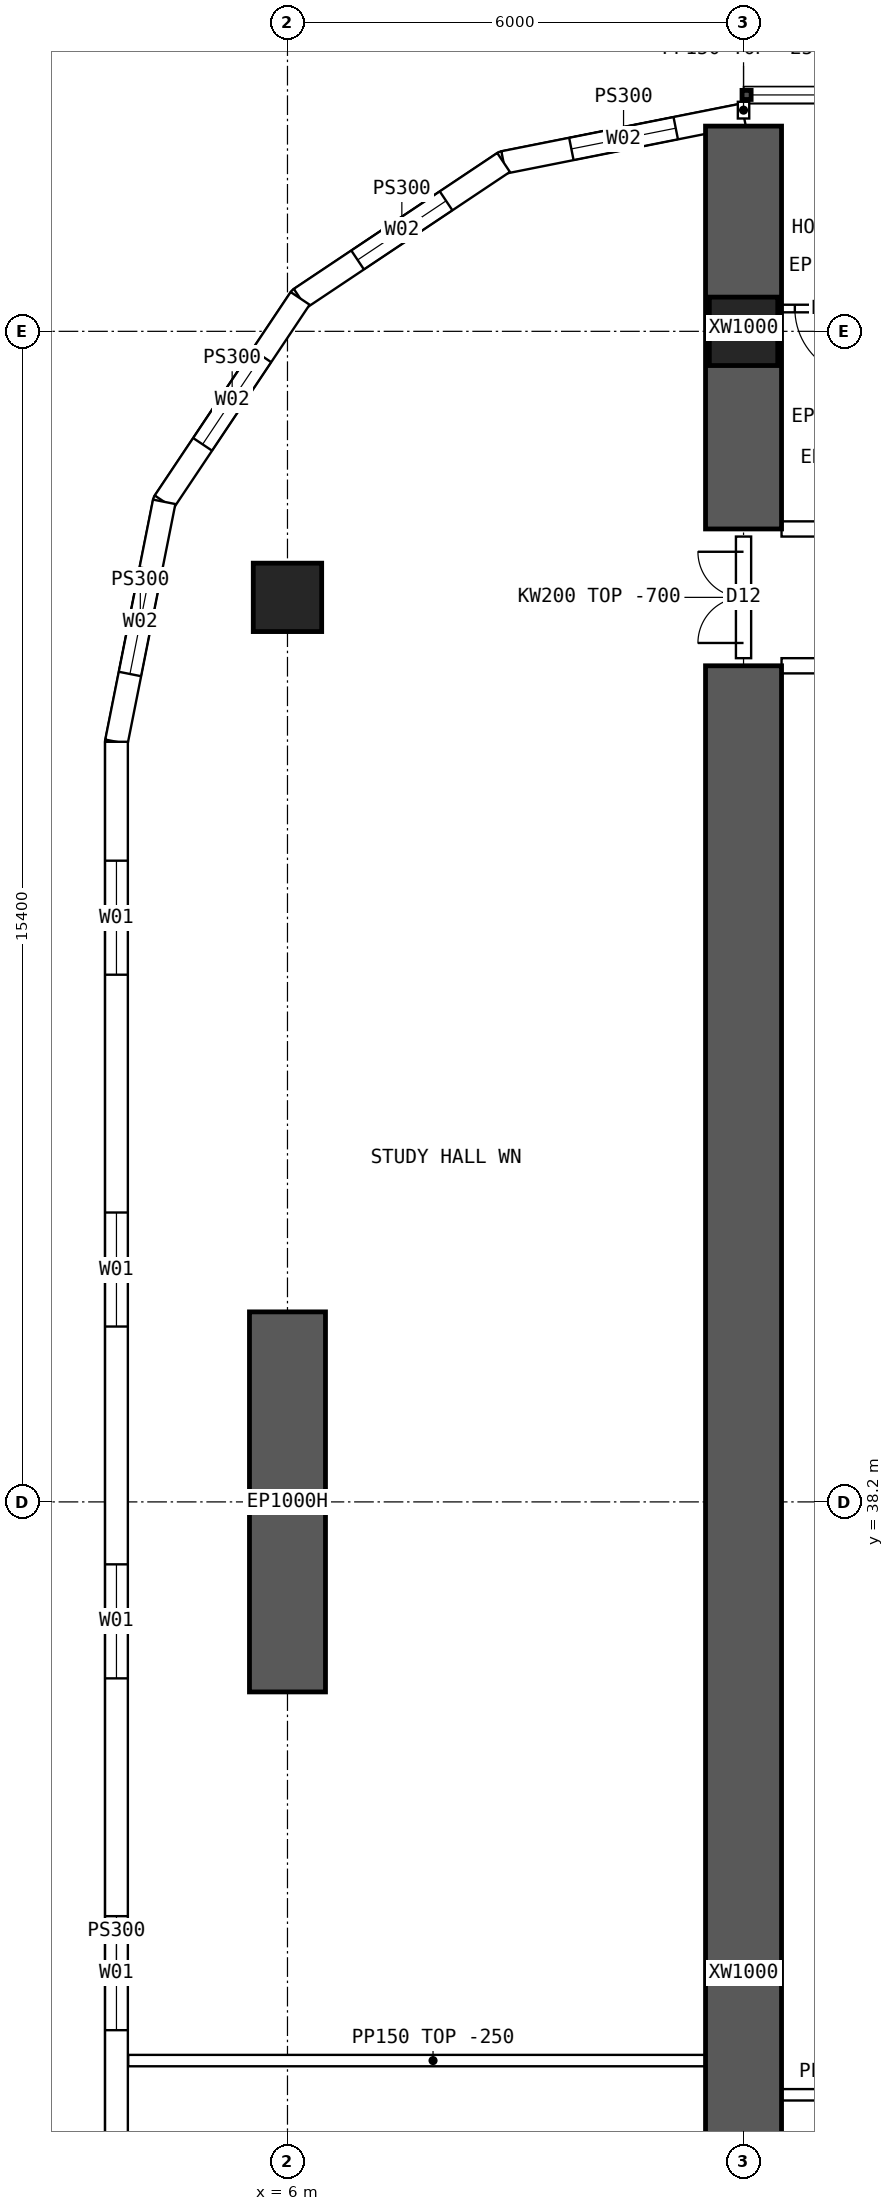
"""IFC4 building model, lengths in metres.
Left out: names, types, materials, properties, quantities, classifications, styles, units other than length and angle.
Written with IfcOpenShell. Run it as: python <this file> out.ifc"""

import sys

from ifc_helpers import new_model, si_unit, direction, frame, frame_2d, origin, origin_2d, place, context, subcontext, project, spatial, polyline, rectangle, hollow_rectangle, outline, extrude, element, fill, save


model = new_model("IFC4")
c1 = context("Model", 3, precision=1e-05, world=origin(), true_north=direction((0.0, 1.0)))
c2 = subcontext(c1, "Body", "Model", "MODEL_VIEW")
j1 = project(units=[si_unit("LENGTHUNIT", "METRE"), si_unit("PLANEANGLEUNIT", "RADIAN")], contexts=[c1])
p1 = place(None, origin())
s1 = spatial("IfcSite", under=j1, at=p1, CompositionType="ELEMENT")
p2 = place(p1, origin())
s2 = spatial("IfcBuilding", under=s1, at=p2, CompositionType="ELEMENT")
p3 = place(p2, frame((0.0, 0.0, 46.45)))
s3 = spatial("IfcBuildingStorey", under=s2, at=p3, CompositionType="ELEMENT", Elevation=46.45)
for number, where, z_axis, x_axis in (
    (1, (12.0, 53.6, 0.0), (0.0, 0.0, 1.0), (1.0, 0.0, 0.0)),
    (2, (6.0, 50.1, 0.0), (0.0, 0.0, 1.0), (1.0, 0.0, 0.0)),
):
    element("IfcColumn", number, at=place(p3, frame(where, z_axis=z_axis, x_axis=x_axis)), inside=s3, PredefinedType="COLUMN", context=c2, shape_type="SweptSolid", body=[
        extrude(hollow_rectangle(XDim=0.9, YDim=0.9, WallThickness=0.09, at=origin_2d()), origin(), (0.0, 0.0, 1.0), 3.75),
    ])
p4 = place(p3, frame((6.0, 35.7, 0.0), z_axis=(0.0, 0.0, 1.0), x_axis=(0.0, 1.0, 0.0)))
e3 = element("IfcWall", 3, at=p4, inside=s3, PredefinedType="SHEAR", context=c2, shape_type="SweptSolid", body=[
    extrude(rectangle(XDim=5.0, YDim=1.0, at=frame_2d((2.5, 0.0))), origin(), (0.0, 0.0, 1.0), 3.75),
])
p5 = place(p3, frame((12.0, 51.0, 0.0), z_axis=(0.0, 0.0, 1.0), x_axis=(0.0, 1.0, 0.0)))
e4 = element("IfcWall", 4, at=p5, inside=s3, PredefinedType="SHEAR", context=c2, shape_type="SweptSolid", body=[
    extrude(rectangle(XDim=5.3, YDim=1.0, at=frame_2d((2.65, 0.0))), origin(), (0.0, 0.0, 1.0), 3.75),
])
p6 = place(p3, frame((12.0, 14.8, 0.0), z_axis=(0.0, 0.0, 1.0), x_axis=(0.0, 1.0, 0.0)))
e5 = element("IfcWall", 5, at=p6, inside=s3, PredefinedType="SHEAR", context=c2, shape_type="SweptSolid", body=[
    extrude(rectangle(XDim=34.4, YDim=1.0, at=frame_2d((17.2, 0.0))), origin(), (0.0, 0.0, 1.0), 3.75),
])
p7 = place(p3, frame((3.75, 48.2, 0.0), z_axis=(0.0, 0.0, 1.0), x_axis=(0.0, -1.0, 0.0)))
e6 = element("IfcWall", 6, at=p7, inside=s3, PredefinedType="SOLIDWALL", context=c2, shape_type="SweptSolid", body=[
    extrude(outline(polyline([(-0.015, -0.15), (32.415, -0.15), (32.385, 0.15), (0.015, 0.15), (-0.015, -0.15)])), origin(), (0.0, 0.0, 1.0), 3.5),
])
p8 = place(p7, frame((1.564, 0.0, 0.9)))
e7 = element("IfcOpeningElement", 7, at=p8, cuts=e6, PredefinedType="OPENING", context=c2, shape_type="SweptSolid", body=[
    extrude(rectangle(XDim=1.5, YDim=2.0, at=frame_2d((0.75, 1.0))), frame((0.0, 0.16, 0.0), z_axis=(0.0, -1.0, 0.0), x_axis=(1.0, 0.0, 0.0)), (0.0, 0.0, 1.0), 0.32),
])
p9 = place(p7, frame((6.193, 0.0, 0.9)))
e8 = element("IfcOpeningElement", 8, at=p9, cuts=e6, PredefinedType="OPENING", context=c2, shape_type="SweptSolid", body=[
    extrude(rectangle(XDim=1.5, YDim=2.0, at=frame_2d((0.75, 1.0))), frame((0.0, 0.16, 0.0), z_axis=(0.0, -1.0, 0.0), x_axis=(1.0, 0.0, 0.0)), (0.0, 0.0, 1.0), 0.32),
])
p10 = place(p7, frame((10.822, 0.0, 0.9)))
e9 = element("IfcOpeningElement", 9, at=p10, cuts=e6, PredefinedType="OPENING", context=c2, shape_type="SweptSolid", body=[
    extrude(rectangle(XDim=1.5, YDim=2.0, at=frame_2d((0.75, 1.0))), frame((0.0, 0.16, 0.0), z_axis=(0.0, -1.0, 0.0), x_axis=(1.0, 0.0, 0.0)), (0.0, 0.0, 1.0), 0.32),
])
p11 = place(p7, frame((15.45, 0.0, 0.9)))
e10 = element("IfcOpeningElement", 10, at=p11, cuts=e6, PredefinedType="OPENING", context=c2, shape_type="SweptSolid", body=[
    extrude(rectangle(XDim=1.5, YDim=2.0, at=frame_2d((0.75, 1.0))), frame((0.0, 0.16, 0.0), z_axis=(0.0, -1.0, 0.0), x_axis=(1.0, 0.0, 0.0)), (0.0, 0.0, 1.0), 0.32),
])
p12 = place(p7, frame((20.079, 0.0, 0.9)))
e11 = element("IfcOpeningElement", 11, at=p12, cuts=e6, PredefinedType="OPENING", context=c2, shape_type="SweptSolid", body=[
    extrude(rectangle(XDim=1.5, YDim=2.0, at=frame_2d((0.75, 1.0))), frame((0.0, 0.16, 0.0), z_axis=(0.0, -1.0, 0.0), x_axis=(1.0, 0.0, 0.0)), (0.0, 0.0, 1.0), 0.32),
])
p13 = place(p7, frame((24.707, 0.0, 0.9)))
e12 = element("IfcOpeningElement", 12, at=p13, cuts=e6, PredefinedType="OPENING", context=c2, shape_type="SweptSolid", body=[
    extrude(rectangle(XDim=1.5, YDim=2.0, at=frame_2d((0.75, 1.0))), frame((0.0, 0.16, 0.0), z_axis=(0.0, -1.0, 0.0), x_axis=(1.0, 0.0, 0.0)), (0.0, 0.0, 1.0), 0.32),
])
p14 = place(p7, frame((29.336, 0.0, 0.9)))
e13 = element("IfcOpeningElement", 13, at=p14, cuts=e6, PredefinedType="OPENING", context=c2, shape_type="SweptSolid", body=[
    extrude(rectangle(XDim=1.5, YDim=2.0, at=frame_2d((0.75, 1.0))), frame((0.0, 0.16, 0.0), z_axis=(0.0, -1.0, 0.0), x_axis=(1.0, 0.0, 0.0)), (0.0, 0.0, 1.0), 0.32),
])
p15 = place(p3, frame((12.0, 56.45, 0.0), z_axis=(0.0, 0.0, 1.0), x_axis=(-0.980787251524, -0.195080412259, 0.0)))
e14 = element("IfcWall", 14, at=p15, inside=s3, PredefinedType="SOLIDWALL", context=c2, shape_type="SweptSolid", body=[
    extrude(outline(polyline([(-0.03, -0.15), (3.249, -0.15), (3.189, 0.15), (0.03, 0.15), (-0.03, -0.15)])), origin(), (0.0, 0.0, 1.0), 3.5),
])
p16 = place(p15, frame((0.909, 0.0, 0.9)))
e15 = element("IfcOpeningElement", 15, at=p16, cuts=e14, PredefinedType="OPENING", context=c2, shape_type="SweptSolid", body=[
    extrude(rectangle(XDim=1.4, YDim=1.8, at=frame_2d((0.7, 0.9))), frame((0.0, 0.16, 0.0), z_axis=(0.0, -1.0, 0.0), x_axis=(1.0, 0.0, 0.0)), (0.0, 0.0, 1.0), 0.32),
])
p17 = place(p3, frame((8.843, 55.822, 0.0), z_axis=(0.0, 0.0, 1.0), x_axis=(-0.831478105043, -0.555557522525, 0.0)))
e16 = element("IfcWall", 16, at=p17, inside=s3, PredefinedType="SOLIDWALL", context=c2, shape_type="SweptSolid", body=[
    extrude(outline(polyline([(-0.03, -0.15), (3.249, -0.15), (3.189, 0.15), (0.03, 0.15), (-0.03, -0.15)])), origin(), (0.0, 0.0, 1.0), 3.5),
])
p18 = place(p17, frame((0.909, 0.0, 0.9)))
e17 = element("IfcOpeningElement", 17, at=p18, cuts=e16, PredefinedType="OPENING", context=c2, shape_type="SweptSolid", body=[
    extrude(rectangle(XDim=1.4, YDim=1.8, at=frame_2d((0.7, 0.9))), frame((0.0, 0.16, 0.0), z_axis=(0.0, -1.0, 0.0), x_axis=(1.0, 0.0, 0.0)), (0.0, 0.0, 1.0), 0.32),
])
p19 = place(p3, frame((6.167, 54.034, 0.0), z_axis=(0.0, 0.0, 1.0), x_axis=(-0.555609954424, -0.831443069936, 0.0)))
e18 = element("IfcWall", 18, at=p19, inside=s3, PredefinedType="SOLIDWALL", context=c2, shape_type="SweptSolid", body=[
    extrude(outline(polyline([(-0.03, -0.15), (3.249, -0.15), (3.189, 0.15), (0.03, 0.15), (-0.03, -0.15)])), origin(), (0.0, 0.0, 1.0), 3.5),
])
p20 = place(p19, frame((0.909, 0.0, 0.9)))
e19 = element("IfcOpeningElement", 19, at=p20, cuts=e18, PredefinedType="OPENING", context=c2, shape_type="SweptSolid", body=[
    extrude(rectangle(XDim=1.4, YDim=1.8, at=frame_2d((0.7, 0.9))), frame((0.0, 0.16, 0.0), z_axis=(0.0, -1.0, 0.0), x_axis=(1.0, 0.0, 0.0)), (0.0, 0.0, 1.0), 0.32),
])
p21 = place(p3, frame((4.378, 51.357, 0.0), z_axis=(0.0, 0.0, 1.0), x_axis=(-0.195065901187, -0.980790137692, 0.0)))
e20 = element("IfcWall", 20, at=p21, inside=s3, PredefinedType="SOLIDWALL", context=c2, shape_type="SweptSolid", body=[
    extrude(outline(polyline([(-0.03, -0.15), (3.234, -0.15), (3.204, 0.15), (0.03, 0.15), (-0.03, -0.15)])), origin(), (0.0, 0.0, 1.0), 3.5),
])
p22 = place(p21, frame((0.909, 0.0, 0.9)))
e21 = element("IfcOpeningElement", 21, at=p22, cuts=e20, PredefinedType="OPENING", context=c2, shape_type="SweptSolid", body=[
    extrude(rectangle(XDim=1.4, YDim=1.8, at=frame_2d((0.7, 0.9))), frame((0.0, 0.16, 0.0), z_axis=(0.0, -1.0, 0.0), x_axis=(1.0, 0.0, 0.0)), (0.0, 0.0, 1.0), 0.32),
])
p23 = place(p3, frame((12.5, 51.0, 0.0), z_axis=(0.0, 0.0, 1.0), x_axis=(1.0, 0.0, 0.0)))
e22 = element("IfcWall", 22, at=p23, inside=s3, PredefinedType="SOLIDWALL", context=c2, shape_type="SweptSolid", body=[
    extrude(outline(polyline([(0.0, 0.0), (5.0, 0.0), (5.0, 3.1), (0.0, 3.1), (0.0, 0.0)])), frame((0.0, 0.1, 0.0), z_axis=(0.0, -1.0, 0.0), x_axis=(1.0, 0.0, 0.0)), (0.0, 0.0, 1.0), 0.2),
])
p24 = place(p23, frame((1.3, 0.0, 0.0)))
e23 = element("IfcOpeningElement", 23, at=p24, cuts=e22, PredefinedType="OPENING", context=c2, shape_type="SweptSolid", body=[
    extrude(rectangle(XDim=0.9, YDim=2.1, at=frame_2d((0.45, 1.05))), frame((0.0, 0.11, 0.0), z_axis=(0.0, -1.0, 0.0), x_axis=(1.0, 0.0, 0.0)), (0.0, 0.0, 1.0), 0.22),
])
p25 = place(p23, frame((2.675, 0.0, 0.0)))
e24 = element("IfcOpeningElement", 24, at=p25, cuts=e22, PredefinedType="OPENING", context=c2, shape_type="SweptSolid", body=[
    extrude(rectangle(XDim=0.9, YDim=2.1, at=frame_2d((0.45, 1.05))), frame((0.0, 0.11, 0.0), z_axis=(0.0, -1.0, 0.0), x_axis=(1.0, 0.0, 0.0)), (0.0, 0.0, 1.0), 0.22),
])
p26 = place(p3, frame((12.5, 49.2, 0.0), z_axis=(0.0, 0.0, 1.0), x_axis=(1.0, 0.0, 0.0)))
e25 = element("IfcWall", 25, at=p26, inside=s3, PredefinedType="SOLIDWALL", context=c2, shape_type="SweptSolid", body=[
    extrude(rectangle(XDim=5.0, YDim=0.2, at=frame_2d((2.5, 0.0))), origin(), (0.0, 0.0, 1.0), 3.5),
])
p27 = place(p26, frame((3.3, 0.0, 0.0)))
e26 = element("IfcOpeningElement", 26, at=p27, cuts=e25, PredefinedType="OPENING", context=c2, shape_type="SweptSolid", body=[
    extrude(rectangle(XDim=1.6, YDim=2.1, at=frame_2d((0.8, 1.05))), frame((0.0, 0.11, 0.0), z_axis=(0.0, -1.0, 0.0), x_axis=(1.0, 0.0, 0.0)), (0.0, 0.0, 1.0), 0.22),
])
p28 = place(p3, frame((12.45, 53.9, 0.0), z_axis=(0.0, 0.0, 1.0), x_axis=(1.0, 0.0, 0.0)))
e27 = element("IfcWall", 27, at=p28, inside=s3, PredefinedType="PARTITIONING", context=c2, shape_type="SweptSolid", body=[
    extrude(rectangle(XDim=1.3, YDim=0.1, at=frame_2d((0.65, 0.0))), origin(), (0.0, 0.0, 1.0), 3.5),
])
p29 = place(p28, frame((0.225, 0.0, 0.0)))
e28 = element("IfcOpeningElement", 28, at=p29, cuts=e27, PredefinedType="OPENING", context=c2, shape_type="SweptSolid", body=[
    extrude(rectangle(XDim=0.9, YDim=2.1, at=frame_2d((0.45, 1.05))), frame((0.0, 0.06, 0.0), z_axis=(0.0, -1.0, 0.0), x_axis=(1.0, 0.0, 0.0)), (0.0, 0.0, 1.0), 0.12),
])
p30 = place(p3, frame((12.0, 30.4, 0.0), z_axis=(0.0, 0.0, 1.0), x_axis=(1.0, 0.0, 0.0)))
e29 = element("IfcWall", 29, at=p30, inside=s3, PredefinedType="PARTITIONING", context=c2, shape_type="SweptSolid", body=[
    extrude(rectangle(XDim=3.6, YDim=0.15, at=frame_2d((1.8, 0.0))), origin(), (0.0, 0.0, 1.0), 3.5),
])
p31 = place(p3, frame((3.905, 30.85, 0.0), z_axis=(0.0, 0.0, 1.0), x_axis=(1.0, 0.0, 0.0)))
e30 = element("IfcWall", 30, at=p31, inside=s3, PredefinedType="PARTITIONING", context=c2, shape_type="SweptSolid", body=[
    extrude(outline(polyline([(0.0, 0.0), (8.02, 0.0), (8.02, 3.5), (2.397, 3.5), (2.395, 3.05), (1.797, 3.05), (1.795, 3.5), (0.0, 3.5), (0.0, 0.0)])), frame((0.0, 0.075, 0.0), z_axis=(0.0, -1.0, 0.0), x_axis=(1.0, 0.0, 0.0)), (0.0, 0.0, 1.0), 0.15),
])
p32 = place(p3, frame((12.0, 49.3, 0.0), z_axis=(0.0, 0.0, 1.0), x_axis=(0.0, 1.0, 0.0)))
e31 = element("IfcWall", 31, at=p32, inside=s3, PredefinedType="SOLIDWALL", context=c2, shape_type="SweptSolid", body=[
    extrude(outline(polyline([(0.0, 0.0), (1.6, 0.0), (1.6, 3.05), (0.0, 3.05), (0.0, 0.0)])), frame((0.0, 0.1, 0.0), z_axis=(0.0, -1.0, 0.0), x_axis=(1.0, 0.0, 0.0)), (0.0, 0.0, 1.0), 0.2),
])
p33 = place(p32, frame((0.2, 0.0, 0.0)))
e32 = element("IfcOpeningElement", 32, at=p33, cuts=e31, PredefinedType="OPENING", context=c2, shape_type="SweptSolid", body=[
    extrude(rectangle(XDim=1.2, YDim=2.1, at=frame_2d((0.6, 1.05))), frame((0.0, 0.11, 0.0), z_axis=(0.0, -1.0, 0.0), x_axis=(1.0, 0.0, 0.0)), (0.0, 0.0, 1.0), 0.22),
])
p34 = place(p3, frame((12.0, 56.4, 0.0), z_axis=(0.0, 0.0, 1.0), x_axis=(0.0, 1.0, 0.0)))
e33 = element("IfcWall", 33, at=p34, inside=s3, PredefinedType="PARTITIONING", context=c2, shape_type="SweptSolid", body=[
    extrude(rectangle(XDim=0.22, YDim=0.15, at=frame_2d((0.11, 0.0))), origin(), (0.0, 0.0, 1.0), 3.5),
])
p35 = place(p8, origin())
e34 = element("IfcWindow", 34, at=p35, inside=s3, PartitioningType="SINGLE_PANEL", PredefinedType="WINDOW", context=c2, shape_type="SweptSolid", body=[
    extrude(rectangle(XDim=1.5, YDim=2.0, at=frame_2d((0.75, 1.0))), frame((0.0, 0.03, 0.0), z_axis=(0.0, -1.0, 0.0), x_axis=(1.0, 0.0, 0.0)), (0.0, 0.0, 1.0), 0.06),
])
fill(e7, e34)
p36 = place(p9, origin())
e35 = element("IfcWindow", 35, at=p36, inside=s3, PartitioningType="SINGLE_PANEL", PredefinedType="WINDOW", context=c2, shape_type="SweptSolid", body=[
    extrude(rectangle(XDim=1.5, YDim=2.0, at=frame_2d((0.75, 1.0))), frame((0.0, 0.03, 0.0), z_axis=(0.0, -1.0, 0.0), x_axis=(1.0, 0.0, 0.0)), (0.0, 0.0, 1.0), 0.06),
])
fill(e8, e35)
p37 = place(p10, origin())
e36 = element("IfcWindow", 36, at=p37, inside=s3, PartitioningType="SINGLE_PANEL", PredefinedType="WINDOW", context=c2, shape_type="SweptSolid", body=[
    extrude(rectangle(XDim=1.5, YDim=2.0, at=frame_2d((0.75, 1.0))), frame((0.0, 0.03, 0.0), z_axis=(0.0, -1.0, 0.0), x_axis=(1.0, 0.0, 0.0)), (0.0, 0.0, 1.0), 0.06),
])
fill(e9, e36)
p38 = place(p11, origin())
e37 = element("IfcWindow", 37, at=p38, inside=s3, PartitioningType="SINGLE_PANEL", PredefinedType="WINDOW", context=c2, shape_type="SweptSolid", body=[
    extrude(rectangle(XDim=1.5, YDim=2.0, at=frame_2d((0.75, 1.0))), frame((0.0, 0.03, 0.0), z_axis=(0.0, -1.0, 0.0), x_axis=(1.0, 0.0, 0.0)), (0.0, 0.0, 1.0), 0.06),
])
fill(e10, e37)
p39 = place(p16, origin())
e38 = element("IfcWindow", 38, at=p39, inside=s3, PartitioningType="SINGLE_PANEL", PredefinedType="WINDOW", context=c2, shape_type="SweptSolid", body=[
    extrude(rectangle(XDim=1.4, YDim=1.8, at=frame_2d((0.7, 0.9))), frame((0.0, 0.03, 0.0), z_axis=(0.0, -1.0, 0.0), x_axis=(1.0, 0.0, 0.0)), (0.0, 0.0, 1.0), 0.06),
])
fill(e15, e38)
p40 = place(p18, origin())
e39 = element("IfcWindow", 39, at=p40, inside=s3, PartitioningType="SINGLE_PANEL", PredefinedType="WINDOW", context=c2, shape_type="SweptSolid", body=[
    extrude(rectangle(XDim=1.4, YDim=1.8, at=frame_2d((0.7, 0.9))), frame((0.0, 0.03, 0.0), z_axis=(0.0, -1.0, 0.0), x_axis=(1.0, 0.0, 0.0)), (0.0, 0.0, 1.0), 0.06),
])
fill(e17, e39)
p41 = place(p20, origin())
e40 = element("IfcWindow", 40, at=p41, inside=s3, PartitioningType="SINGLE_PANEL", PredefinedType="WINDOW", context=c2, shape_type="SweptSolid", body=[
    extrude(rectangle(XDim=1.4, YDim=1.8, at=frame_2d((0.7, 0.9))), frame((0.0, 0.03, 0.0), z_axis=(0.0, -1.0, 0.0), x_axis=(1.0, 0.0, 0.0)), (0.0, 0.0, 1.0), 0.06),
])
fill(e19, e40)
p42 = place(p22, origin())
e41 = element("IfcWindow", 41, at=p42, inside=s3, PartitioningType="SINGLE_PANEL", PredefinedType="WINDOW", context=c2, shape_type="SweptSolid", body=[
    extrude(rectangle(XDim=1.4, YDim=1.8, at=frame_2d((0.7, 0.9))), frame((0.0, 0.03, 0.0), z_axis=(0.0, -1.0, 0.0), x_axis=(1.0, 0.0, 0.0)), (0.0, 0.0, 1.0), 0.06),
])
fill(e21, e41)
p43 = place(p29, origin())
e42 = element("IfcDoor", 42, at=p43, inside=s3, OperationType="SINGLE_SWING_RIGHT", PredefinedType="DOOR", context=c2, shape_type="SweptSolid", body=[
    extrude(rectangle(XDim=0.9, YDim=2.1, at=frame_2d((0.45, 1.05))), frame((0.0, 0.025, 0.0), z_axis=(0.0, -1.0, 0.0), x_axis=(1.0, 0.0, 0.0)), (0.0, 0.0, 1.0), 0.05),
])
fill(e28, e42)
p44 = place(p33, origin())
e43 = element("IfcDoor", 43, at=p44, inside=s3, OperationType="DOUBLE_DOOR_SINGLE_SWING", PredefinedType="DOOR", context=c2, shape_type="SweptSolid", body=[
    extrude(rectangle(XDim=1.2, YDim=2.1, at=frame_2d((0.6, 1.05))), frame((0.0, 0.025, 0.0), z_axis=(0.0, -1.0, 0.0), x_axis=(1.0, 0.0, 0.0)), (0.0, 0.0, 1.0), 0.05),
])
fill(e32, e43)
save(model, sys.argv[1])
